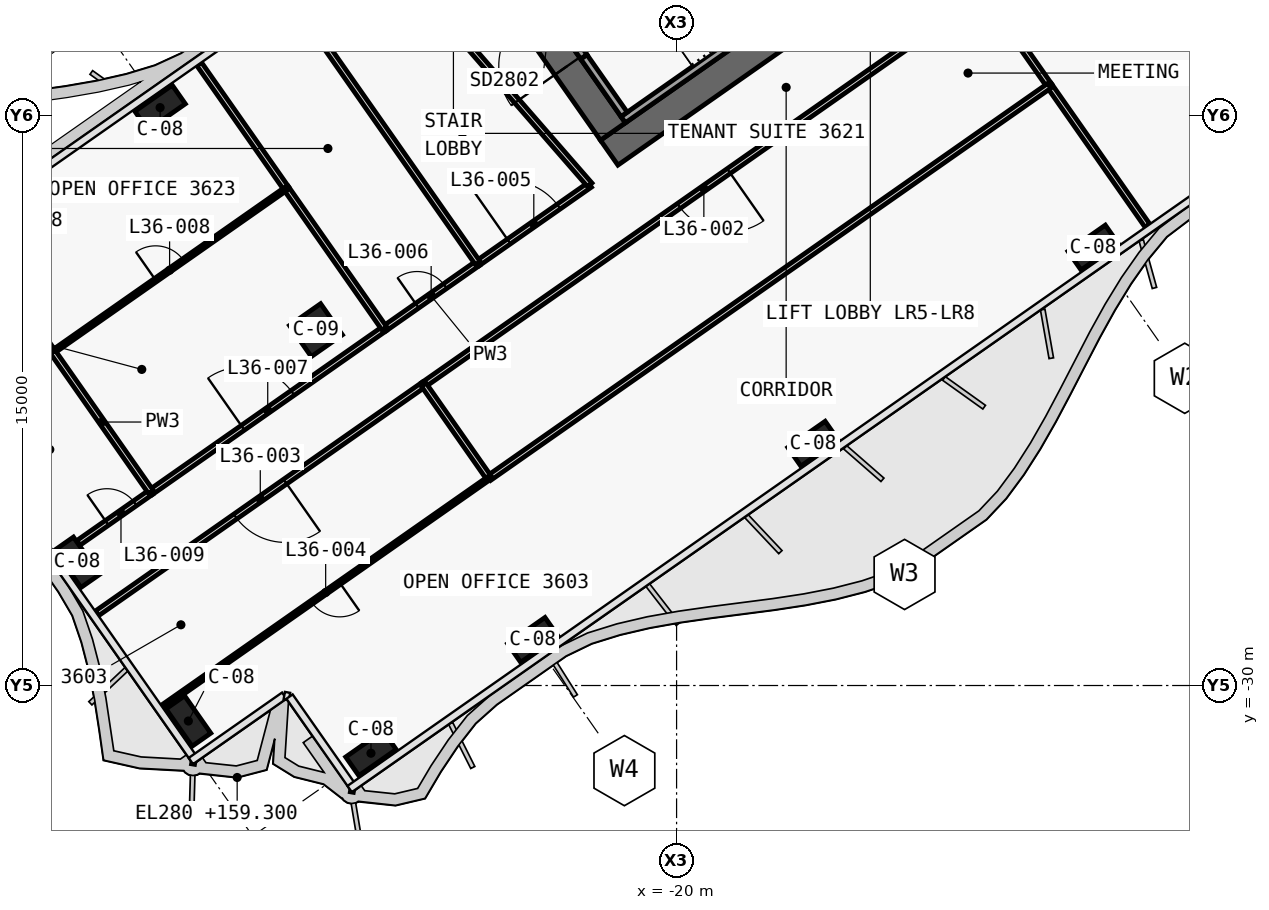
"""IFC4 building model, lengths in metres.
Left out: names, types, materials, properties, quantities, classifications, styles, units other than length and angle.
Written with IfcOpenShell. Run it as: python <this file> out.ifc"""

import sys

from ifc_helpers import new_model, si_unit, direction, frame, frame_2d, origin, origin_2d, place, context, subcontext, project, spatial, polyline, rectangle, outline, extrude, element, fill, save


model = new_model("IFC4")
c1 = context("Model", 3, precision=1e-05, world=origin(), true_north=direction((0.0, 1.0)))
c2 = subcontext(c1, "Body", "Model", "MODEL_VIEW")
j1 = project(units=[si_unit("LENGTHUNIT", "METRE"), si_unit("PLANEANGLEUNIT", "RADIAN")], contexts=[c1])
p1 = place(None, origin())
s1 = spatial("IfcSite", under=j1, at=p1, CompositionType="ELEMENT")
p2 = place(p1, origin())
s2 = spatial("IfcBuilding", under=s1, at=p2, CompositionType="ELEMENT")
p3 = place(p2, frame((0.0, 0.0, 159.3)))
s3 = spatial("IfcBuildingStorey", under=s2, at=p3, CompositionType="ELEMENT", Elevation=159.3)
p4 = place(p3, frame((0.029, -0.712, 0.0), z_axis=(0.0, 0.0, 1.0), x_axis=(-0.819151758019, -0.573576845187, 0.0)))
e1 = element("IfcWall", 1, at=p4, inside=s3, PredefinedType="SHEAR", context=c2, shape_type="SweptSolid", body=[
    extrude(outline(polyline([(26.616, 0.4), (0.56, 0.4), (-0.0, -0.4), (26.616, -0.4), (26.616, 0.4)])), origin(), (0.0, 0.0, 1.0), 3.9),
])
p5 = place(p4, frame((2.966, 0.0, 0.0)))
e2 = element("IfcOpeningElement", 2, at=p5, cuts=e1, PredefinedType="OPENING", context=c2, shape_type="SweptSolid", body=[
    extrude(rectangle(XDim=2.4, YDim=2.1, at=frame_2d((1.2, 1.05))), frame((0.0, 0.41, 0.0), z_axis=(0.0, -1.0, 0.0), x_axis=(1.0, 0.0, 0.0)), (0.0, 0.0, 1.0), 0.82),
])
p6 = place(p4, frame((11.916, 0.0, 0.0)))
e3 = element("IfcOpeningElement", 3, at=p6, cuts=e1, PredefinedType="OPENING", context=c2, shape_type="SweptSolid", body=[
    extrude(rectangle(XDim=2.4, YDim=2.1, at=frame_2d((1.2, 1.05))), frame((0.0, 0.41, 0.0), z_axis=(0.0, -1.0, 0.0), x_axis=(1.0, 0.0, 0.0)), (0.0, 0.0, 1.0), 0.82),
])
p7 = place(p3, frame((-21.675, -15.421, 0.0), z_axis=(0.0, 0.0, 1.0), x_axis=(-0.573581815061, 0.819148278049, 0.0)))
e4 = element("IfcWall", 4, at=p7, inside=s3, PredefinedType="SHEAR", context=c2, shape_type="SweptSolid", body=[
    extrude(outline(polyline([(0.0, 0.4), (0.0, -0.4), (9.6, -0.4), (9.6, 0.4), (0.0, 0.4)])), origin(), (0.0, 0.0, 1.0), 3.9),
])
p8 = place(p7, frame((6.3, 0.0, 0.0)))
e5 = element("IfcOpeningElement", 5, at=p8, cuts=e4, PredefinedType="OPENING", context=c2, shape_type="SweptSolid", body=[
    extrude(rectangle(XDim=1.8, YDim=2.1, at=frame_2d((0.9, 1.05))), frame((0.0, 0.41, 0.0), z_axis=(0.0, -1.0, 0.0), x_axis=(1.0, 0.0, 0.0)), (0.0, 0.0, 1.0), 0.82),
])
p9 = place(p7, frame((2.1, 0.0, 0.0)))
e6 = element("IfcOpeningElement", 6, at=p9, cuts=e4, PredefinedType="OPENING", context=c2, shape_type="SweptSolid", body=[
    extrude(rectangle(XDim=1.8, YDim=2.1, at=frame_2d((0.9, 1.05))), frame((0.0, 0.41, 0.0), z_axis=(0.0, -1.0, 0.0), x_axis=(1.0, 0.0, 0.0)), (0.0, 0.0, 1.0), 0.82),
])
for number, where, z_axis, x_axis in (
    (7, (-9.038, -18.475, 0.0), (0.0, 0.0, 1.0), (-0.819, -0.574, 0.0)),
    (8, (-16.41, -23.637, 0.0), (0.0, 0.0, 1.0), (-0.819, -0.574, 0.0)),
    (9, (-23.782, -28.799, 0.0), (0.0, 0.0, 1.0), (-0.819, -0.574, 0.0)),
    (10, (-28.042, -31.782, 0.0), (0.0, 0.0, 1.0), (-0.819, -0.574, 0.0)),
    (11, (-33.591, -14.792, 0.0), (0.0, 0.0, 1.0), (-0.819, -0.574, 0.0)),
    (12, (-32.847, -30.935, 0.0), (0.0, 0.0, 1.0), (-0.574, 0.819, 0.0)),
    (13, (-35.772, -26.757, 0.0), (0.0, 0.0, 1.0), (-0.574, 0.819, 0.0)),
):
    element("IfcColumn", number, at=place(p3, frame(where, z_axis=z_axis, x_axis=x_axis)), inside=s3, PredefinedType="COLUMN", context=c2, shape_type="SweptSolid", body=[
        extrude(rectangle(XDim=1.2, YDim=0.6, at=origin_2d()), origin(), (0.0, 0.0, 1.0), 3.9),
    ])
p10 = place(p3, frame((-29.49, -20.649, 0.0), z_axis=(0.0, 0.0, 1.0), x_axis=(-0.819152044289, -0.573576436351, 0.0)))
e14 = element("IfcColumn", 14, at=p10, inside=s3, PredefinedType="COLUMN", context=c2, shape_type="SweptSolid", body=[
    extrude(rectangle(XDim=1.0, YDim=1.0, at=origin_2d()), origin(), (0.0, 0.0, 1.0), 3.9),
])
p11 = place(p3, frame((-14.851, -10.521, 0.0), z_axis=(0.0, 0.0, 1.0), x_axis=(-0.819141584393, -0.57359137434, 0.0)))
e15 = element("IfcWall", 15, at=p11, inside=s3, PredefinedType="SOLIDWALL", context=c2, shape_type="SweptSolid", body=[
    extrude(rectangle(XDim=8.0, YDim=0.2, at=frame_2d((4.0, 0.0))), origin(), (0.0, 0.0, 1.0), 3.62),
])
p12 = place(p3, frame((-21.38, -14.97, 0.0), z_axis=(0.0, 0.0, 1.0), x_axis=(-0.573559770908, 0.819163713305, 0.0)))
e16 = element("IfcWall", 16, at=p12, inside=s3, PredefinedType="SOLIDWALL", context=c2, shape_type="SweptSolid", body=[
    extrude(rectangle(XDim=1.85, YDim=0.2, at=frame_2d((0.925, 0.0))), origin(), (0.0, 0.0, 1.0), 3.62),
])
p13 = place(p3, frame((-22.441, -13.455, 2.15), z_axis=(0.0, 0.0, 1.0), x_axis=(-0.573591692345, 0.819141361715, 0.0)))
e17 = element("IfcWall", 17, at=p13, inside=s3, PredefinedType="SOLIDWALL", context=c2, shape_type="SweptSolid", body=[
    extrude(rectangle(XDim=1.9, YDim=0.2, at=frame_2d((0.95, 0.0))), origin(), (0.0, 0.0, 1.0), 1.47),
])
p14 = place(p3, frame((-25.231, -18.888, 0.0), z_axis=(0.0, 0.0, 1.0), x_axis=(0.819152236293, 0.573576162141, 0.0)))
e18 = element("IfcWall", 18, at=p14, inside=s3, PredefinedType="PARTITIONING", context=c2, shape_type="SweptSolid", body=[
    extrude(rectangle(XDim=3.599, YDim=0.15, at=frame_2d((1.799, 0.0))), origin(), (0.0, 0.0, 1.0), 3.0),
])
p15 = place(p14, frame((1.0, 0.0, 0.0)))
e19 = element("IfcOpeningElement", 19, at=p15, cuts=e18, PredefinedType="OPENING", context=c2, shape_type="SweptSolid", body=[
    extrude(rectangle(XDim=1.6, YDim=2.1, at=frame_2d((0.8, 1.05))), frame((0.0, 0.085, 0.0), z_axis=(0.0, -1.0, 0.0), x_axis=(1.0, 0.0, 0.0)), (0.0, 0.0, 1.0), 0.17),
])
p16 = place(p3, frame((-27.688, -20.609, 0.0), z_axis=(0.0, 0.0, 1.0), x_axis=(0.81916700466, 0.573555070134, 0.0)))
e20 = element("IfcWall", 20, at=p16, inside=s3, PredefinedType="PARTITIONING", context=c2, shape_type="SweptSolid", body=[
    extrude(rectangle(XDim=3.004, YDim=0.15, at=frame_2d((1.502, 0.0))), origin(), (0.0, 0.0, 1.0), 3.62),
])
p17 = place(p16, frame((1.052, 0.0, 0.0)))
e21 = element("IfcOpeningElement", 21, at=p17, cuts=e20, PredefinedType="OPENING", context=c2, shape_type="SweptSolid", body=[
    extrude(rectangle(XDim=0.9, YDim=2.1, at=frame_2d((0.45, 1.05))), frame((0.0, 0.085, 0.0), z_axis=(0.0, -1.0, 0.0), x_axis=(1.0, 0.0, 0.0)), (0.0, 0.0, 1.0), 0.17),
])
p18 = place(p3, frame((-33.832, -24.911, 0.0), z_axis=(0.0, 0.0, 1.0), x_axis=(0.819127966345, 0.573610821682, 0.0)))
e22 = element("IfcWall", 22, at=p18, inside=s3, PredefinedType="PARTITIONING", context=c2, shape_type="SweptSolid", body=[
    extrude(rectangle(XDim=7.504, YDim=0.15, at=frame_2d((3.752, 0.0))), origin(), (0.0, 0.0, 1.0), 3.0),
])
p19 = place(p18, frame((2.952, 0.0, 0.0)))
e23 = element("IfcOpeningElement", 23, at=p19, cuts=e22, PredefinedType="OPENING", context=c2, shape_type="SweptSolid", body=[
    extrude(rectangle(XDim=1.6, YDim=2.1, at=frame_2d((0.8, 1.05))), frame((0.0, 0.085, 0.0), z_axis=(0.0, -1.0, 0.0), x_axis=(1.0, 0.0, 0.0)), (0.0, 0.0, 1.0), 0.17),
])
p20 = place(p3, frame((-35.739, -26.247, 0.0), z_axis=(0.0, 0.0, 1.0), x_axis=(0.819123698998, 0.573616915492, 0.0)))
e24 = element("IfcWall", 24, at=p20, inside=s3, PredefinedType="PARTITIONING", context=c2, shape_type="SweptSolid", body=[
    extrude(rectangle(XDim=2.332, YDim=0.15, at=frame_2d((1.166, 0.0))), origin(), (0.0, 0.0, 1.0), 3.0),
])
p21 = place(p20, frame((0.916, 0.0, 0.0)))
e25 = element("IfcOpeningElement", 25, at=p21, cuts=e24, PredefinedType="OPENING", context=c2, shape_type="SweptSolid", body=[
    extrude(rectangle(XDim=0.9, YDim=2.1, at=frame_2d((0.45, 1.05))), frame((0.0, 0.085, 0.0), z_axis=(0.0, -1.0, 0.0), x_axis=(1.0, 0.0, 0.0)), (0.0, 0.0, 1.0), 0.17),
])
p22 = place(p3, frame((-11.908, -11.757, 0.0), z_axis=(0.0, 0.0, 1.0), x_axis=(-0.81915291695, -0.57357519006, 0.0)))
e26 = element("IfcWall", 26, at=p22, inside=s3, PredefinedType="PARTITIONING", context=c2, shape_type="SweptSolid", body=[
    extrude(rectangle(XDim=18.004, YDim=0.15, at=frame_2d((9.002, 0.0))), origin(), (0.0, 0.0, 1.0), 3.0),
])
p23 = place(p22, frame((8.202, 0.0, 0.0)))
e27 = element("IfcOpeningElement", 27, at=p23, cuts=e26, PredefinedType="OPENING", context=c2, shape_type="SweptSolid", body=[
    extrude(rectangle(XDim=1.6, YDim=2.1, at=frame_2d((0.8, 1.05))), frame((0.0, 0.085, 0.0), z_axis=(0.0, -1.0, 0.0), x_axis=(1.0, 0.0, 0.0)), (0.0, 0.0, 1.0), 0.17),
])
p24 = place(p3, frame((-26.653, -22.081, 0.0), z_axis=(0.0, 0.0, 1.0), x_axis=(-0.819154371039, -0.573573113393, 0.0)))
e28 = element("IfcWall", 28, at=p24, inside=s3, PredefinedType="PARTITIONING", context=c2, shape_type="SweptSolid", body=[
    extrude(rectangle(XDim=10.502, YDim=0.15, at=frame_2d((5.251, 0.0))), origin(), (0.0, 0.0, 1.0), 2.9),
])
p25 = place(p24, frame((4.451, 0.0, 0.0)))
e29 = element("IfcOpeningElement", 29, at=p25, cuts=e28, PredefinedType="OPENING", context=c2, shape_type="SweptSolid", body=[
    extrude(rectangle(XDim=1.6, YDim=2.1, at=frame_2d((0.8, 1.05))), frame((0.0, 0.085, 0.0), z_axis=(0.0, -1.0, 0.0), x_axis=(1.0, 0.0, 0.0)), (0.0, 0.0, 1.0), 0.17),
])
p26 = place(p3, frame((-22.284, -16.826, 0.0), z_axis=(0.0, 0.0, 1.0), x_axis=(-0.656758142177, 0.754101281449, 0.0)))
e30 = element("IfcWall", 30, at=p26, inside=s3, PredefinedType="PARTITIONING", context=c2, shape_type="SweptSolid", body=[
    extrude(rectangle(XDim=6.539, YDim=0.15, at=frame_2d((3.269, 0.0))), origin(), (0.0, 0.0, 1.0), 3.0),
])
p27 = place(p3, frame((-25.23, -18.887, 0.0), z_axis=(0.0, 0.0, 1.0), x_axis=(-0.573572219642, 0.819154996844, 0.0)))
e31 = element("IfcWall", 31, at=p27, inside=s3, PredefinedType="PARTITIONING", context=c2, shape_type="SweptSolid", body=[
    extrude(rectangle(XDim=8.5, YDim=0.15, at=frame_2d((4.25, 0.0))), origin(), (0.0, 0.0, 1.0), 3.0),
])
p28 = place(p3, frame((-30.268, -16.922, 0.0), z_axis=(0.0, 0.0, 1.0), x_axis=(-0.573593387921, 0.81914017441, 0.0)))
e32 = element("IfcWall", 32, at=p28, inside=s3, PredefinedType="PARTITIONING", context=c2, shape_type="SweptSolid", body=[
    extrude(rectangle(XDim=4.001, YDim=0.15, at=frame_2d((2.0, 0.0))), origin(), (0.0, 0.0, 1.0), 3.0),
])
p29 = place(p3, frame((-27.687, -20.607, 0.0), z_axis=(0.0, 0.0, 1.0), x_axis=(-0.573553333433, 0.819168220641, 0.0)))
e33 = element("IfcWall", 33, at=p29, inside=s3, PredefinedType="PARTITIONING", context=c2, shape_type="SweptSolid", body=[
    extrude(rectangle(XDim=4.502, YDim=0.15, at=frame_2d((2.251, 0.0))), origin(), (0.0, 0.0, 1.0), 3.0),
])
p30 = place(p3, frame((-36.413, -21.222, 0.0), z_axis=(0.0, 0.0, 1.0), x_axis=(0.819147803225, 0.57358249317, 0.0)))
e34 = element("IfcWall", 34, at=p30, inside=s3, PredefinedType="PARTITIONING", context=c2, shape_type="SweptSolid", body=[
    extrude(rectangle(XDim=7.5, YDim=0.1, at=frame_2d((3.75, 0.0))), origin(), (0.0, 0.0, 1.0), 3.0),
])
p31 = place(p30, frame((3.3, 0.0, 0.0)))
e35 = element("IfcOpeningElement", 35, at=p31, cuts=e34, PredefinedType="OPENING", context=c2, shape_type="SweptSolid", body=[
    extrude(rectangle(XDim=0.9, YDim=2.1, at=frame_2d((0.45, 1.05))), frame((0.0, 0.06, 0.0), z_axis=(0.0, -1.0, 0.0), x_axis=(1.0, 0.0, 0.0)), (0.0, 0.0, 1.0), 0.12),
])
p32 = place(p3, frame((-36.413, -21.222, 0.0), z_axis=(0.0, 0.0, 1.0), x_axis=(-0.573462344363, 0.819231920519, 0.0)))
e36 = element("IfcWall", 36, at=p32, inside=s3, PredefinedType="PARTITIONING", context=c2, shape_type="SweptSolid", body=[
    extrude(rectangle(XDim=1.201, YDim=0.15, at=frame_2d((0.601, 0.0))), origin(), (0.0, 0.0, 1.0), 3.62),
])
p33 = place(p3, frame((-33.831, -24.909, 0.0), z_axis=(0.0, 0.0, 1.0), x_axis=(-0.573560650686, 0.819163097304, 0.0)))
e37 = element("IfcWall", 37, at=p33, inside=s3, PredefinedType="PARTITIONING", context=c2, shape_type="SweptSolid", body=[
    extrude(rectangle(XDim=4.5, YDim=0.15, at=frame_2d((2.25, 0.0))), origin(), (0.0, 0.0, 1.0), 3.0),
])
p34 = place(p3, frame((-10.188, -14.217, 0.0), z_axis=(0.0, 0.0, 1.0), x_axis=(-0.57356603932, 0.81915932427, 0.0)))
e38 = element("IfcWall", 38, at=p34, inside=s3, PredefinedType="PARTITIONING", context=c2, shape_type="SweptSolid", body=[
    extrude(rectangle(XDim=3.002, YDim=0.15, at=frame_2d((1.501, 0.0))), origin(), (0.0, 0.0, 1.0), 3.62),
])
p35 = place(p3, frame((-7.608, -17.901, 0.0), z_axis=(0.0, 0.0, 1.0), x_axis=(-0.573556991349, 0.819165659482, 0.0)))
e39 = element("IfcWall", 39, at=p35, inside=s3, PredefinedType="PARTITIONING", context=c2, shape_type="SweptSolid", body=[
    extrude(rectangle(XDim=4.501, YDim=0.15, at=frame_2d((2.25, 0.0))), origin(), (0.0, 0.0, 1.0), 2.9),
])
p36 = place(p3, frame((-10.189, -14.215, 0.0), z_axis=(0.0, 0.0, 1.0), x_axis=(-0.81915226268, -0.573576124456, 0.0)))
e40 = element("IfcWall", 40, at=p36, inside=s3, PredefinedType="PARTITIONING", context=c2, shape_type="SweptSolid", body=[
    extrude(rectangle(XDim=18.0, YDim=0.15, at=frame_2d((9.0, 0.0))), origin(), (0.0, 0.0, 1.0), 3.0),
])
p37 = place(p3, frame((-24.934, -24.54, 0.0), z_axis=(0.0, 0.0, 1.0), x_axis=(-0.573560650686, 0.819163097304, 0.0)))
e41 = element("IfcWall", 41, at=p37, inside=s3, PredefinedType="PARTITIONING", context=c2, shape_type="SweptSolid", body=[
    extrude(rectangle(XDim=3.0, YDim=0.15, at=frame_2d((1.5, 0.0))), origin(), (0.0, 0.0, 1.0), 3.62),
])
p38 = place(p3, frame((-24.933, -24.54, 0.0), z_axis=(0.0, 0.0, 1.0), x_axis=(-0.819155448096, -0.573571575181, 0.0)))
e42 = element("IfcWall", 42, at=p38, inside=s3, PredefinedType="PARTITIONING", context=c2, shape_type="SweptSolid", body=[
    extrude(rectangle(XDim=10.5, YDim=0.1, at=frame_2d((5.25, 0.0))), origin(), (0.0, 0.0, 1.0), 2.9),
])
p39 = place(p38, frame((4.8, 0.0, 0.0)))
e43 = element("IfcOpeningElement", 43, at=p39, cuts=e42, PredefinedType="OPENING", context=c2, shape_type="SweptSolid", body=[
    extrude(rectangle(XDim=0.9, YDim=2.1, at=frame_2d((0.45, 1.05))), frame((0.0, 0.06, 0.0), z_axis=(0.0, -1.0, 0.0), x_axis=(1.0, 0.0, 0.0)), (0.0, 0.0, 1.0), 0.12),
])
p40 = place(p9, origin())
e44 = element("IfcDoor", 44, at=p40, inside=s3, OperationType="DOUBLE_DOOR_SINGLE_SWING", PredefinedType="DOOR", context=c2, shape_type="SweptSolid", body=[
    extrude(rectangle(XDim=1.8, YDim=2.1, at=frame_2d((0.9, 1.05))), frame((0.0, 0.025, 0.0), z_axis=(0.0, -1.0, 0.0), x_axis=(1.0, 0.0, 0.0)), (0.0, 0.0, 1.0), 0.05),
])
fill(e6, e44)
p41 = place(p23, origin())
e45 = element("IfcDoor", 45, at=p41, inside=s3, OperationType="DOUBLE_DOOR_SINGLE_SWING", PredefinedType="DOOR", context=c2, shape_type="SweptSolid", body=[
    extrude(rectangle(XDim=1.6, YDim=2.1, at=frame_2d((0.8, 1.05))), frame((0.0, 0.025, 0.0), z_axis=(0.0, -1.0, 0.0), x_axis=(1.0, 0.0, 0.0)), (0.0, 0.0, 1.0), 0.05),
])
fill(e27, e45)
p42 = place(p25, origin())
e46 = element("IfcDoor", 46, at=p42, inside=s3, OperationType="DOUBLE_DOOR_SINGLE_SWING", PredefinedType="DOOR", context=c2, shape_type="SweptSolid", body=[
    extrude(rectangle(XDim=1.6, YDim=2.1, at=frame_2d((0.8, 1.05))), frame((0.0, 0.025, 0.0), z_axis=(0.0, -1.0, 0.0), x_axis=(1.0, 0.0, 0.0)), (0.0, 0.0, 1.0), 0.05),
])
fill(e29, e46)
p43 = place(p39, origin())
e47 = element("IfcDoor", 47, at=p43, inside=s3, OperationType="SINGLE_SWING_LEFT", PredefinedType="DOOR", context=c2, shape_type="SweptSolid", body=[
    extrude(rectangle(XDim=0.9, YDim=2.1, at=frame_2d((0.45, 1.05))), frame((0.0, 0.025, 0.0), z_axis=(0.0, -1.0, 0.0), x_axis=(1.0, 0.0, 0.0)), (0.0, 0.0, 1.0), 0.05),
])
fill(e43, e47)
p44 = place(p15, origin())
e48 = element("IfcDoor", 48, at=p44, inside=s3, OperationType="DOUBLE_DOOR_SINGLE_SWING", PredefinedType="DOOR", context=c2, shape_type="SweptSolid", body=[
    extrude(rectangle(XDim=1.6, YDim=2.1, at=frame_2d((0.8, 1.05))), frame((0.0, 0.025, 0.0), z_axis=(0.0, -1.0, 0.0), x_axis=(1.0, 0.0, 0.0)), (0.0, 0.0, 1.0), 0.05),
])
fill(e19, e48)
p45 = place(p17, origin())
e49 = element("IfcDoor", 49, at=p45, inside=s3, OperationType="SINGLE_SWING_LEFT", PredefinedType="DOOR", context=c2, shape_type="SweptSolid", body=[
    extrude(rectangle(XDim=0.9, YDim=2.1, at=frame_2d((0.45, 1.05))), frame((0.0, 0.025, 0.0), z_axis=(0.0, -1.0, 0.0), x_axis=(1.0, 0.0, 0.0)), (0.0, 0.0, 1.0), 0.05),
])
fill(e21, e49)
p46 = place(p19, origin())
e50 = element("IfcDoor", 50, at=p46, inside=s3, OperationType="DOUBLE_DOOR_SINGLE_SWING", PredefinedType="DOOR", context=c2, shape_type="SweptSolid", body=[
    extrude(rectangle(XDim=1.6, YDim=2.1, at=frame_2d((0.8, 1.05))), frame((0.0, 0.025, 0.0), z_axis=(0.0, -1.0, 0.0), x_axis=(1.0, 0.0, 0.0)), (0.0, 0.0, 1.0), 0.05),
])
fill(e23, e50)
p47 = place(p31, origin())
e51 = element("IfcDoor", 51, at=p47, inside=s3, OperationType="SINGLE_SWING_RIGHT", PredefinedType="DOOR", context=c2, shape_type="SweptSolid", body=[
    extrude(rectangle(XDim=0.9, YDim=2.1, at=frame_2d((0.45, 1.05))), frame((0.0, 0.025, 0.0), z_axis=(0.0, -1.0, 0.0), x_axis=(1.0, 0.0, 0.0)), (0.0, 0.0, 1.0), 0.05),
])
fill(e35, e51)
p48 = place(p21, origin())
e52 = element("IfcDoor", 52, at=p48, inside=s3, OperationType="SINGLE_SWING_LEFT", PredefinedType="DOOR", context=c2, shape_type="SweptSolid", body=[
    extrude(rectangle(XDim=0.9, YDim=2.1, at=frame_2d((0.45, 1.05))), frame((0.0, 0.025, 0.0), z_axis=(0.0, -1.0, 0.0), x_axis=(1.0, 0.0, 0.0)), (0.0, 0.0, 1.0), 0.05),
])
fill(e25, e52)
save(model, sys.argv[1])
